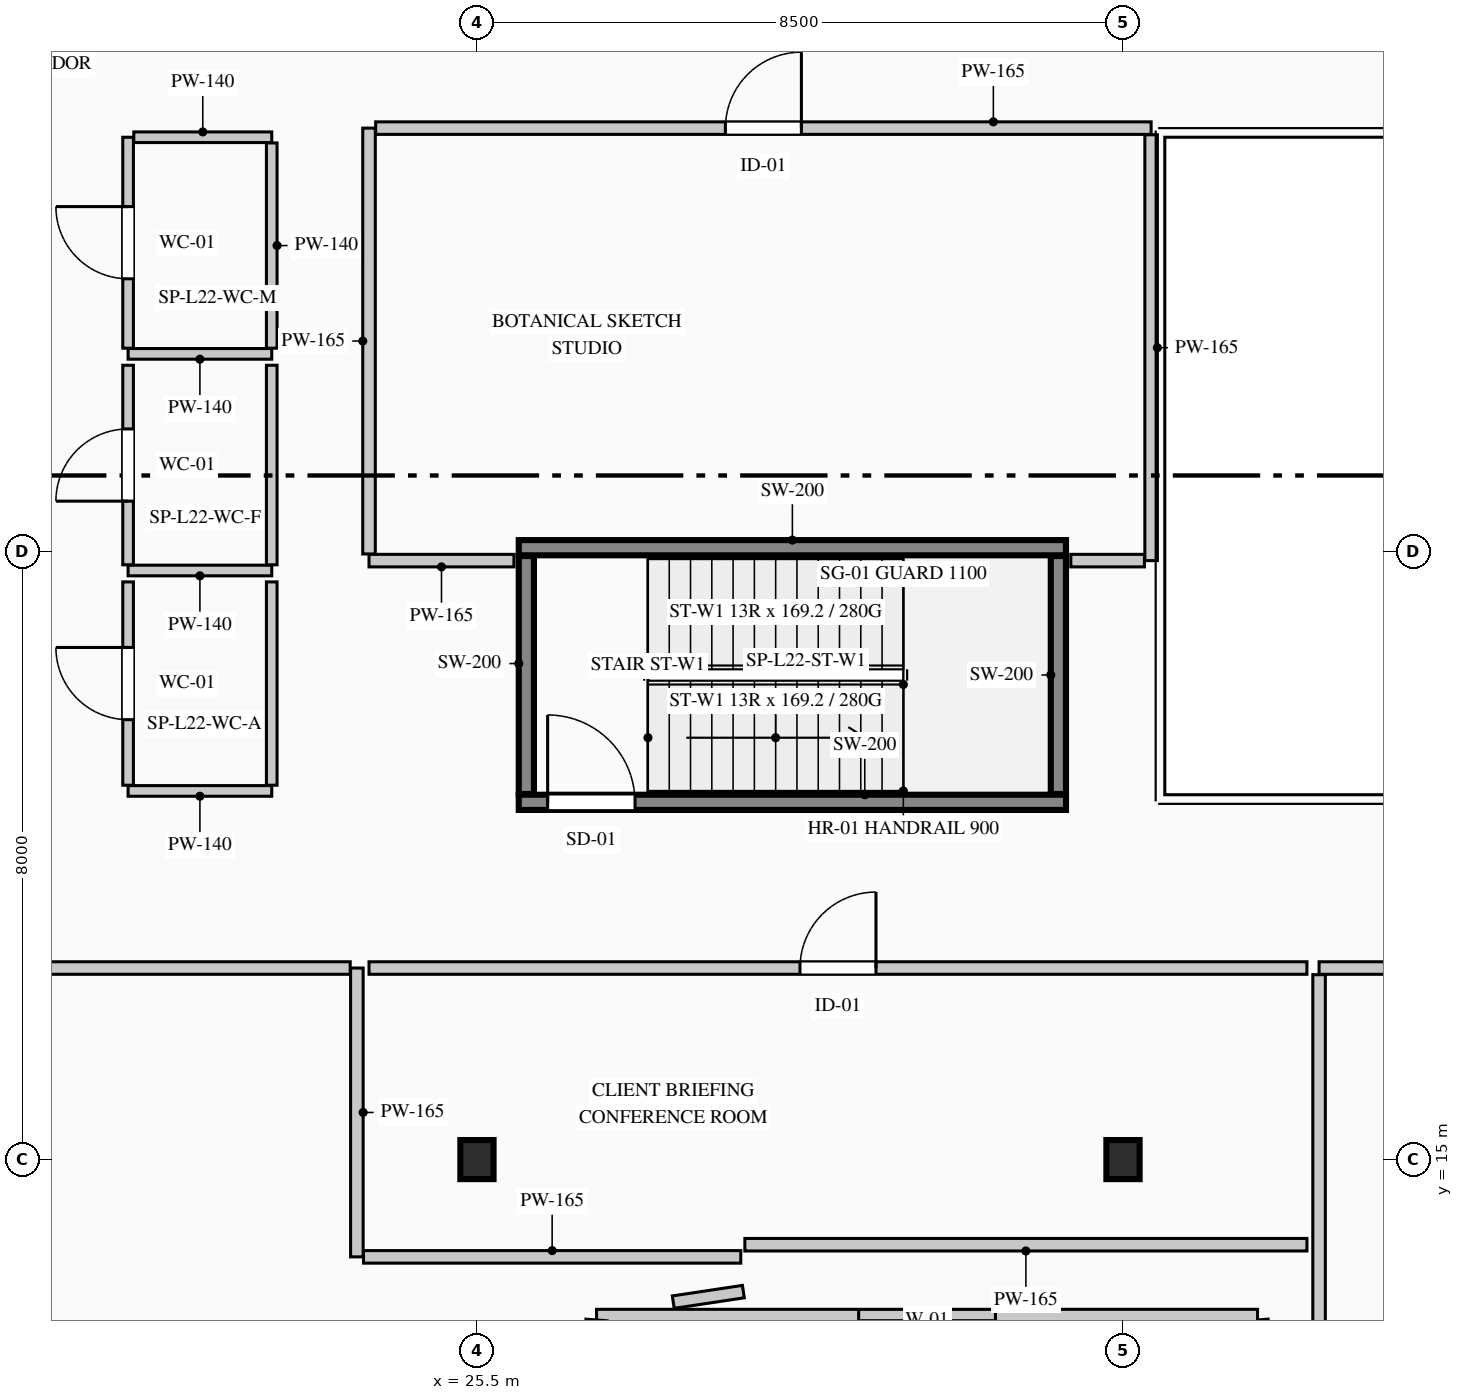
"""IFC4 building model, lengths in metres.
Left out: names, types, materials, properties, quantities, classifications, styles, units other than length and angle.
Written with IfcOpenShell. Run it as: python <this file> out.ifc"""

import sys

from ifc_helpers import new_model, si_unit, direction, frame, frame_2d, origin, origin_2d, place, context, subcontext, project, spatial, rectangle, i_section, extrude, element, fill, save


model = new_model("IFC4")
c1 = context("Model", 3, precision=1e-05, world=origin(), true_north=direction((0.0, 1.0)))
c2 = subcontext(c1, "Body", "Model", "MODEL_VIEW")
j1 = project(units=[si_unit("LENGTHUNIT", "METRE"), si_unit("PLANEANGLEUNIT", "RADIAN")], contexts=[c1])
p1 = place(None, origin())
s1 = spatial("IfcSite", under=j1, at=p1, CompositionType="ELEMENT")
p2 = place(p1, origin())
s2 = spatial("IfcBuilding", under=s1, at=p2, CompositionType="ELEMENT")
p3 = place(p2, frame((0.0, 0.0, 97.4)))
s3 = spatial("IfcBuildingStorey", under=s2, at=p3, CompositionType="ELEMENT", Elevation=97.4)
p4 = place(p3, frame((26.05, 19.7, 0.0), z_axis=(0.0, 0.0, 1.0), x_axis=(1.0, 0.0, 0.0)))
e1 = element("IfcWall", 1, at=p4, inside=s3, PredefinedType="SHEAR", context=c2, shape_type="SweptSolid", body=[
    extrude(rectangle(XDim=7.2, YDim=0.2, at=frame_2d((3.6, 0.0))), origin(), (0.0, 0.0, 1.0), 4.4),
])
p5 = place(p4, frame((0.38, 0.0, 0.0)))
e2 = element("IfcOpeningElement", 2, at=p5, cuts=e1, PredefinedType="OPENING", context=c2, shape_type="SweptSolid", body=[
    extrude(rectangle(XDim=1.15, YDim=2.2, at=frame_2d((0.575, 1.1))), frame((0.0, 0.11, 0.0), z_axis=(0.0, -1.0, 0.0), x_axis=(1.0, 0.0, 0.0)), (0.0, 0.0, 1.0), 0.22),
])
p6 = place(p3, frame((26.05, 23.05, 0.0), z_axis=(0.0, 0.0, 1.0), x_axis=(1.0, 0.0, 0.0)))
e3 = element("IfcWall", 3, at=p6, inside=s3, PredefinedType="SHEAR", context=c2, shape_type="SweptSolid", body=[
    extrude(rectangle(XDim=7.2, YDim=0.2, at=frame_2d((3.6, 0.0))), origin(), (0.0, 0.0, 1.0), 4.4),
])
for number, where, z_axis, x_axis in (
    (4, (26.15, 19.81, 0.0), (0.0, 0.0, 1.0), (0.0, 1.0, 0.0)),
    (5, (33.15, 19.81, 0.0), (0.0, 0.0, 1.0), (0.0, 1.0, 0.0)),
):
    element("IfcWall", number, at=place(p3, frame(where, z_axis=z_axis, x_axis=x_axis)), inside=s3, PredefinedType="SHEAR", context=c2, shape_type="SweptSolid", body=[
        extrude(rectangle(XDim=3.13, YDim=0.2, at=frame_2d((1.565, 0.0))), origin(), (0.0, 0.0, 1.0), 4.4),
    ])
for number, where, z_axis, x_axis in (
    (6, (25.5, 15.0, 0.0), (0.0, 0.0, 1.0), (1.0, 0.0, 0.0)),
    (7, (34.0, 15.0, 0.0), (0.0, 0.0, 1.0), (1.0, 0.0, 0.0)),
):
    element("IfcColumn", number, at=place(p3, frame(where, z_axis=z_axis, x_axis=x_axis)), inside=s3, PredefinedType="COLUMN", context=c2, shape_type="SweptSolid", body=[
        extrude(i_section(OverallWidth=0.437, OverallDepth=0.514, WebThickness=0.061, FlangeThickness=0.077, FilletRadius=0.015, at=origin_2d()), origin(), (0.0, 0.0, 1.0), 4.4),
    ])
p7 = place(p3, frame((36.57, 2.64, 0.0), z_axis=(0.0, 0.0, 1.0), x_axis=(-0.077816860153, 0.996967670627, 0.0)))
e8 = element("IfcWall", 8, at=p7, inside=s3, PredefinedType="STANDARD", context=c2, shape_type="SweptSolid", body=[
    extrude(rectangle(XDim=10.281, YDim=0.28, at=frame_2d((5.141, 0.0))), origin(), (0.0, 0.0, 1.0), 4.115),
])
p8 = place(p7, frame((5.68, 0.0, 0.9)))
e9 = element("IfcOpeningElement", 9, at=p8, cuts=e8, PredefinedType="OPENING", context=c2, shape_type="SweptSolid", body=[
    extrude(rectangle(XDim=1.8, YDim=2.1, at=frame_2d((0.9, 1.05))), frame((0.0, 0.15, 0.0), z_axis=(0.0, -1.0, 0.0), x_axis=(1.0, 0.0, 0.0)), (0.0, 0.0, 1.0), 0.3),
])
p9 = place(p3, frame((35.77, 12.89, 0.0), z_axis=(0.0, 0.0, 1.0), x_axis=(-1.0, 0.0, 0.0)))
e10 = element("IfcWall", 10, at=p9, inside=s3, PredefinedType="STANDARD", context=c2, shape_type="SweptSolid", body=[
    extrude(rectangle(XDim=8.697, YDim=0.28, at=frame_2d((4.348, 0.0))), origin(), (0.0, 0.0, 1.0), 4.115),
])
p10 = place(p9, frame((3.448, 0.0, 0.9)))
e11 = element("IfcOpeningElement", 11, at=p10, cuts=e10, PredefinedType="OPENING", context=c2, shape_type="SweptSolid", body=[
    extrude(rectangle(XDim=1.8, YDim=2.1, at=frame_2d((0.9, 1.05))), frame((0.0, 0.15, 0.0), z_axis=(0.0, -1.0, 0.0), x_axis=(1.0, 0.0, 0.0)), (0.0, 0.0, 1.0), 0.3),
])
p11 = place(p3, frame((27.073, 12.89, 0.0), z_axis=(0.0, 0.0, 1.0), x_axis=(-0.077816860153, -0.996967670627, 0.0)))
e12 = element("IfcWall", 12, at=p11, inside=s3, PredefinedType="STANDARD", context=c2, shape_type="SweptSolid", body=[
    extrude(rectangle(XDim=10.281, YDim=0.28, at=frame_2d((5.141, 0.0))), origin(), (0.0, 0.0, 1.0), 4.115),
])
p12 = place(p11, frame((2.801, 0.0, 0.9)))
e13 = element("IfcOpeningElement", 13, at=p12, cuts=e12, PredefinedType="OPENING", context=c2, shape_type="SweptSolid", body=[
    extrude(rectangle(XDim=1.8, YDim=2.1, at=frame_2d((0.9, 1.05))), frame((0.0, 0.15, 0.0), z_axis=(0.0, -1.0, 0.0), x_axis=(1.0, 0.0, 0.0)), (0.0, 0.0, 1.0), 0.3),
])
p13 = place(p3, frame((22.8, 25.6, 0.0), z_axis=(0.0, 0.0, 1.0), x_axis=(-1.0, 0.0, 0.0)))
e14 = element("IfcWall", 14, at=p13, inside=s3, PredefinedType="PARTITIONING", context=c2, shape_type="SweptSolid", body=[
    extrude(rectangle(XDim=1.89, YDim=0.14, at=frame_2d((0.945, 0.0))), origin(), (0.0, 0.0, 1.0), 4.115),
])
p14 = place(p3, frame((20.91, 25.675, 0.0), z_axis=(0.0, 0.0, 1.0), x_axis=(0.0, 1.0, 0.0)))
e15 = element("IfcWall", 15, at=p14, inside=s3, PredefinedType="PARTITIONING", context=c2, shape_type="SweptSolid", body=[
    extrude(rectangle(XDim=2.775, YDim=0.14, at=frame_2d((1.387, 0.0))), origin(), (0.0, 0.0, 1.0), 4.115),
])
p15 = place(p14, frame((0.913, 0.0, 0.0)))
e16 = element("IfcOpeningElement", 16, at=p15, cuts=e15, PredefinedType="OPENING", context=c2, shape_type="SweptSolid", body=[
    extrude(rectangle(XDim=0.95, YDim=2.15, at=frame_2d((0.475, 1.075))), frame((0.0, 0.08, 0.0), z_axis=(0.0, -1.0, 0.0), x_axis=(1.0, 0.0, 0.0)), (0.0, 0.0, 1.0), 0.16),
])
p16 = place(p3, frame((20.985, 28.45, 0.0), z_axis=(0.0, 0.0, 1.0), x_axis=(1.0, 0.0, 0.0)))
e17 = element("IfcWall", 17, at=p16, inside=s3, PredefinedType="PARTITIONING", context=c2, shape_type="SweptSolid", body=[
    extrude(rectangle(XDim=1.815, YDim=0.14, at=frame_2d((0.907, 0.0))), origin(), (0.0, 0.0, 1.0), 4.115),
])
p17 = place(p3, frame((22.8, 28.375, 0.0), z_axis=(0.0, 0.0, 1.0), x_axis=(0.0, -1.0, 0.0)))
e18 = element("IfcWall", 18, at=p17, inside=s3, PredefinedType="PARTITIONING", context=c2, shape_type="SweptSolid", body=[
    extrude(rectangle(XDim=2.7, YDim=0.14, at=frame_2d((1.35, 0.0))), origin(), (0.0, 0.0, 1.0), 3.7),
])
p18 = place(p3, frame((22.8, 22.75, 0.0), z_axis=(0.0, 0.0, 1.0), x_axis=(-1.0, 0.0, 0.0)))
e19 = element("IfcWall", 19, at=p18, inside=s3, PredefinedType="PARTITIONING", context=c2, shape_type="SweptSolid", body=[
    extrude(rectangle(XDim=1.89, YDim=0.14, at=frame_2d((0.945, 0.0))), origin(), (0.0, 0.0, 1.0), 4.115),
])
p19 = place(p3, frame((20.91, 22.825, 0.0), z_axis=(0.0, 0.0, 1.0), x_axis=(0.0, 1.0, 0.0)))
e20 = element("IfcWall", 20, at=p19, inside=s3, PredefinedType="PARTITIONING", context=c2, shape_type="SweptSolid", body=[
    extrude(rectangle(XDim=2.625, YDim=0.14, at=frame_2d((1.312, 0.0))), origin(), (0.0, 0.0, 1.0), 4.115),
])
p20 = place(p19, frame((0.837, 0.0, 0.0)))
e21 = element("IfcOpeningElement", 21, at=p20, cuts=e20, PredefinedType="OPENING", context=c2, shape_type="SweptSolid", body=[
    extrude(rectangle(XDim=0.95, YDim=2.15, at=frame_2d((0.475, 1.075))), frame((0.0, 0.08, 0.0), z_axis=(0.0, -1.0, 0.0), x_axis=(1.0, 0.0, 0.0)), (0.0, 0.0, 1.0), 0.16),
])
p21 = place(p3, frame((22.8, 25.45, 0.0), z_axis=(0.0, 0.0, 1.0), x_axis=(0.0, -1.0, 0.0)))
e22 = element("IfcWall", 22, at=p21, inside=s3, PredefinedType="PARTITIONING", context=c2, shape_type="SweptSolid", body=[
    extrude(rectangle(XDim=2.625, YDim=0.14, at=frame_2d((1.312, 0.0))), origin(), (0.0, 0.0, 1.0), 3.7),
])
p22 = place(p3, frame((22.8, 19.85, 0.0), z_axis=(0.0, 0.0, 1.0), x_axis=(-1.0, 0.0, 0.0)))
e23 = element("IfcWall", 23, at=p22, inside=s3, PredefinedType="PARTITIONING", context=c2, shape_type="SweptSolid", body=[
    extrude(rectangle(XDim=1.89, YDim=0.14, at=frame_2d((0.945, 0.0))), origin(), (0.0, 0.0, 1.0), 4.115),
])
p23 = place(p3, frame((20.91, 19.925, 0.0), z_axis=(0.0, 0.0, 1.0), x_axis=(0.0, 1.0, 0.0)))
e24 = element("IfcWall", 24, at=p23, inside=s3, PredefinedType="PARTITIONING", context=c2, shape_type="SweptSolid", body=[
    extrude(rectangle(XDim=2.675, YDim=0.14, at=frame_2d((1.337, 0.0))), origin(), (0.0, 0.0, 1.0), 4.115),
])
p24 = place(p23, frame((0.863, 0.0, 0.0)))
e25 = element("IfcOpeningElement", 25, at=p24, cuts=e24, PredefinedType="OPENING", context=c2, shape_type="SweptSolid", body=[
    extrude(rectangle(XDim=0.95, YDim=2.15, at=frame_2d((0.475, 1.075))), frame((0.0, 0.08, 0.0), z_axis=(0.0, -1.0, 0.0), x_axis=(1.0, 0.0, 0.0)), (0.0, 0.0, 1.0), 0.16),
])
p25 = place(p3, frame((22.8, 22.6, 0.0), z_axis=(0.0, 0.0, 1.0), x_axis=(0.0, -1.0, 0.0)))
e26 = element("IfcWall", 26, at=p25, inside=s3, PredefinedType="PARTITIONING", context=c2, shape_type="SweptSolid", body=[
    extrude(rectangle(XDim=2.675, YDim=0.14, at=frame_2d((1.337, 0.0))), origin(), (0.0, 0.0, 1.0), 3.7),
])
p26 = place(p3, frame((23.92, 17.52, 0.0), z_axis=(0.0, 0.0, 1.0), x_axis=(0.0, -1.0, 0.0)))
e27 = element("IfcWall", 27, at=p26, inside=s3, PredefinedType="PARTITIONING", context=c2, shape_type="SweptSolid", body=[
    extrude(rectangle(XDim=3.8, YDim=0.165, at=frame_2d((1.9, 0.0))), origin(), (0.0, 0.0, 1.0), 3.7),
])
p27 = place(p3, frame((24.008, 13.72, 0.0), z_axis=(0.0, 0.0, 1.0), x_axis=(1.0, 0.0, 0.0)))
e28 = element("IfcWall", 28, at=p27, inside=s3, PredefinedType="PARTITIONING", context=c2, shape_type="SweptSolid", body=[
    extrude(rectangle(XDim=4.963, YDim=0.165, at=frame_2d((2.482, 0.0))), origin(), (0.0, 0.0, 1.0), 4.115),
])
p28 = place(p3, frame((29.005, 13.263, 0.0), z_axis=(0.0, 0.0, 1.0), x_axis=(-0.988919061759, -0.148455681233, 0.0)))
e29 = element("IfcWall", 29, at=p28, inside=s3, PredefinedType="PARTITIONING", context=c2, shape_type="SweptSolid", body=[
    extrude(rectangle(XDim=0.932, YDim=0.165, at=frame_2d((0.466, 0.0))), origin(), (0.0, 0.0, 1.0), 4.115),
])
p29 = place(p3, frame((12.367, 17.52, 0.0), z_axis=(0.0, 0.0, 1.0), x_axis=(1.0, 0.0, 0.0)))
e30 = element("IfcWall", 30, at=p29, inside=s3, PredefinedType="PARTITIONING", context=c2, shape_type="SweptSolid", body=[
    extrude(rectangle(XDim=11.465, YDim=0.165, at=frame_2d((5.732, 0.0))), origin(), (0.0, 0.0, 1.0), 4.115),
])
p30 = place(p29, frame((5.232, 0.0, 0.0)))
e31 = element("IfcOpeningElement", 31, at=p30, cuts=e30, PredefinedType="OPENING", context=c2, shape_type="SweptSolid", body=[
    extrude(rectangle(XDim=1.0, YDim=2.15, at=frame_2d((0.5, 1.075))), frame((0.0, 0.093, 0.0), z_axis=(0.0, -1.0, 0.0), x_axis=(1.0, 0.0, 0.0)), (0.0, 0.0, 1.0), 0.185),
])
p31 = place(p3, frame((36.58, 17.52, 0.0), z_axis=(0.0, 0.0, 1.0), x_axis=(1.0, 0.0, 0.0)))
e32 = element("IfcWall", 32, at=p31, inside=s3, PredefinedType="PARTITIONING", context=c2, shape_type="SweptSolid", body=[
    extrude(rectangle(XDim=8.4, YDim=0.165, at=frame_2d((4.2, 0.0))), origin(), (0.0, 0.0, 1.0), 4.115),
])
p32 = place(p31, frame((3.7, 0.0, 0.0)))
e33 = element("IfcOpeningElement", 33, at=p32, cuts=e32, PredefinedType="OPENING", context=c2, shape_type="SweptSolid", body=[
    extrude(rectangle(XDim=1.0, YDim=2.15, at=frame_2d((0.5, 1.075))), frame((0.0, 0.093, 0.0), z_axis=(0.0, -1.0, 0.0), x_axis=(1.0, 0.0, 0.0)), (0.0, 0.0, 1.0), 0.185),
])
p33 = place(p3, frame((36.58, 5.525, 0.0), z_axis=(0.0, 0.0, 1.0), x_axis=(0.0, 1.0, 0.0)))
e34 = element("IfcWall", 34, at=p33, inside=s3, PredefinedType="PARTITIONING", context=c2, shape_type="SweptSolid", body=[
    extrude(rectangle(XDim=11.907, YDim=0.165, at=frame_2d((5.954, 0.0))), origin(), (0.0, 0.0, 1.0), 4.115),
])
p34 = place(p3, frame((24.08, 17.52, 0.0), z_axis=(0.0, 0.0, 1.0), x_axis=(1.0, 0.0, 0.0)))
e35 = element("IfcWall", 35, at=p34, inside=s3, PredefinedType="PARTITIONING", context=c2, shape_type="SweptSolid", body=[
    extrude(rectangle(XDim=12.34, YDim=0.165, at=frame_2d((6.17, 0.0))), origin(), (0.0, 0.0, 1.0), 3.7),
])
p35 = place(p34, frame((5.67, 0.0, 0.0)))
e36 = element("IfcOpeningElement", 36, at=p35, cuts=e35, PredefinedType="OPENING", context=c2, shape_type="SweptSolid", body=[
    extrude(rectangle(XDim=1.0, YDim=2.15, at=frame_2d((0.5, 1.075))), frame((0.0, 0.093, 0.0), z_axis=(0.0, -1.0, 0.0), x_axis=(1.0, 0.0, 0.0)), (0.0, 0.0, 1.0), 0.185),
])
p36 = place(p3, frame((36.42, 13.88, 0.0), z_axis=(0.0, 0.0, 1.0), x_axis=(-1.0, 0.0, 0.0)))
e37 = element("IfcWall", 37, at=p36, inside=s3, PredefinedType="PARTITIONING", context=c2, shape_type="SweptSolid", body=[
    extrude(rectangle(XDim=7.395, YDim=0.165, at=frame_2d((3.698, 0.0))), origin(), (0.0, 0.0, 1.0), 4.115),
])
p37 = place(p3, frame((25.987, 22.88, 0.0), z_axis=(0.0, 0.0, 1.0), x_axis=(-1.0, 0.0, 0.0)))
e38 = element("IfcWall", 38, at=p37, inside=s3, PredefinedType="PARTITIONING", context=c2, shape_type="SweptSolid", body=[
    extrude(rectangle(XDim=1.907, YDim=0.165, at=frame_2d((0.953, 0.0))), origin(), (0.0, 0.0, 1.0), 4.115),
])
p38 = place(p3, frame((24.08, 22.968, 0.0), z_axis=(0.0, 0.0, 1.0), x_axis=(0.0, 1.0, 0.0)))
e39 = element("IfcWall", 39, at=p38, inside=s3, PredefinedType="PARTITIONING", context=c2, shape_type="SweptSolid", body=[
    extrude(rectangle(XDim=5.603, YDim=0.165, at=frame_2d((2.801, 0.0))), origin(), (0.0, 0.0, 1.0), 4.115),
])
p39 = place(p3, frame((24.167, 28.57, 0.0), z_axis=(0.0, 0.0, 1.0), x_axis=(1.0, 0.0, 0.0)))
e40 = element("IfcWall", 40, at=p39, inside=s3, PredefinedType="PARTITIONING", context=c2, shape_type="SweptSolid", body=[
    extrude(rectangle(XDim=10.203, YDim=0.165, at=frame_2d((5.101, 0.0))), origin(), (0.0, 0.0, 1.0), 3.7),
])
p40 = place(p39, frame((4.601, 0.0, 0.0)))
e41 = element("IfcOpeningElement", 41, at=p40, cuts=e40, PredefinedType="OPENING", context=c2, shape_type="SweptSolid", body=[
    extrude(rectangle(XDim=1.0, YDim=2.15, at=frame_2d((0.5, 1.075))), frame((0.0, 0.093, 0.0), z_axis=(0.0, -1.0, 0.0), x_axis=(1.0, 0.0, 0.0)), (0.0, 0.0, 1.0), 0.185),
])
p41 = place(p3, frame((34.37, 28.482, 0.0), z_axis=(0.0, 0.0, 1.0), x_axis=(0.0, -1.0, 0.0)))
e42 = element("IfcWall", 42, at=p41, inside=s3, PredefinedType="PARTITIONING", context=c2, shape_type="SweptSolid", body=[
    extrude(rectangle(XDim=5.603, YDim=0.165, at=frame_2d((2.801, 0.0))), origin(), (0.0, 0.0, 1.0), 4.115),
])
p42 = place(p3, frame((34.282, 22.88, 0.0), z_axis=(0.0, 0.0, 1.0), x_axis=(-1.0, 0.0, 0.0)))
e43 = element("IfcWall", 43, at=p42, inside=s3, PredefinedType="PARTITIONING", context=c2, shape_type="SweptSolid", body=[
    extrude(rectangle(XDim=0.969, YDim=0.165, at=frame_2d((0.485, 0.0))), origin(), (0.0, 0.0, 1.0), 4.115),
])
p43 = place(p10, origin())
e44 = element("IfcWindow", 44, at=p43, inside=s3, PartitioningType="SINGLE_PANEL", PredefinedType="WINDOW", context=c2, shape_type="SweptSolid", body=[
    extrude(rectangle(XDim=1.8, YDim=2.1, at=frame_2d((0.9, 1.05))), frame((0.0, 0.03, 0.0), z_axis=(0.0, -1.0, 0.0), x_axis=(1.0, 0.0, 0.0)), (0.0, 0.0, 1.0), 0.06),
])
fill(e11, e44)
p44 = place(p5, origin())
e45 = element("IfcDoor", 45, at=p44, inside=s3, OperationType="SINGLE_SWING_LEFT", PredefinedType="DOOR", context=c2, shape_type="SweptSolid", body=[
    extrude(rectangle(XDim=1.15, YDim=2.2, at=frame_2d((0.575, 1.1))), frame((0.0, 0.025, 0.0), z_axis=(0.0, -1.0, 0.0), x_axis=(1.0, 0.0, 0.0)), (0.0, 0.0, 1.0), 0.05),
])
fill(e2, e45)
p45 = place(p15, origin())
e46 = element("IfcDoor", 46, at=p45, inside=s3, OperationType="SINGLE_SWING_RIGHT", PredefinedType="DOOR", context=c2, shape_type="SweptSolid", body=[
    extrude(rectangle(XDim=0.95, YDim=2.15, at=frame_2d((0.475, 1.075))), frame((0.0, 0.025, 0.0), z_axis=(0.0, -1.0, 0.0), x_axis=(1.0, 0.0, 0.0)), (0.0, 0.0, 1.0), 0.05),
])
fill(e16, e46)
p46 = place(p20, origin())
e47 = element("IfcDoor", 47, at=p46, inside=s3, OperationType="SINGLE_SWING_LEFT", PredefinedType="DOOR", context=c2, shape_type="SweptSolid", body=[
    extrude(rectangle(XDim=0.95, YDim=2.15, at=frame_2d((0.475, 1.075))), frame((0.0, 0.025, 0.0), z_axis=(0.0, -1.0, 0.0), x_axis=(1.0, 0.0, 0.0)), (0.0, 0.0, 1.0), 0.05),
])
fill(e21, e47)
p47 = place(p24, origin())
e48 = element("IfcDoor", 48, at=p47, inside=s3, OperationType="SINGLE_SWING_RIGHT", PredefinedType="DOOR", context=c2, shape_type="SweptSolid", body=[
    extrude(rectangle(XDim=0.95, YDim=2.15, at=frame_2d((0.475, 1.075))), frame((0.0, 0.025, 0.0), z_axis=(0.0, -1.0, 0.0), x_axis=(1.0, 0.0, 0.0)), (0.0, 0.0, 1.0), 0.05),
])
fill(e25, e48)
p48 = place(p35, origin())
e49 = element("IfcDoor", 49, at=p48, inside=s3, OperationType="SINGLE_SWING_RIGHT", PredefinedType="DOOR", context=c2, shape_type="SweptSolid", body=[
    extrude(rectangle(XDim=1.0, YDim=2.15, at=frame_2d((0.5, 1.075))), frame((0.0, 0.025, 0.0), z_axis=(0.0, -1.0, 0.0), x_axis=(1.0, 0.0, 0.0)), (0.0, 0.0, 1.0), 0.05),
])
fill(e36, e49)
p49 = place(p40, origin())
e50 = element("IfcDoor", 50, at=p49, inside=s3, OperationType="SINGLE_SWING_RIGHT", PredefinedType="DOOR", context=c2, shape_type="SweptSolid", body=[
    extrude(rectangle(XDim=1.0, YDim=2.15, at=frame_2d((0.5, 1.075))), frame((0.0, 0.025, 0.0), z_axis=(0.0, -1.0, 0.0), x_axis=(1.0, 0.0, 0.0)), (0.0, 0.0, 1.0), 0.05),
])
fill(e41, e50)
save(model, sys.argv[1])
